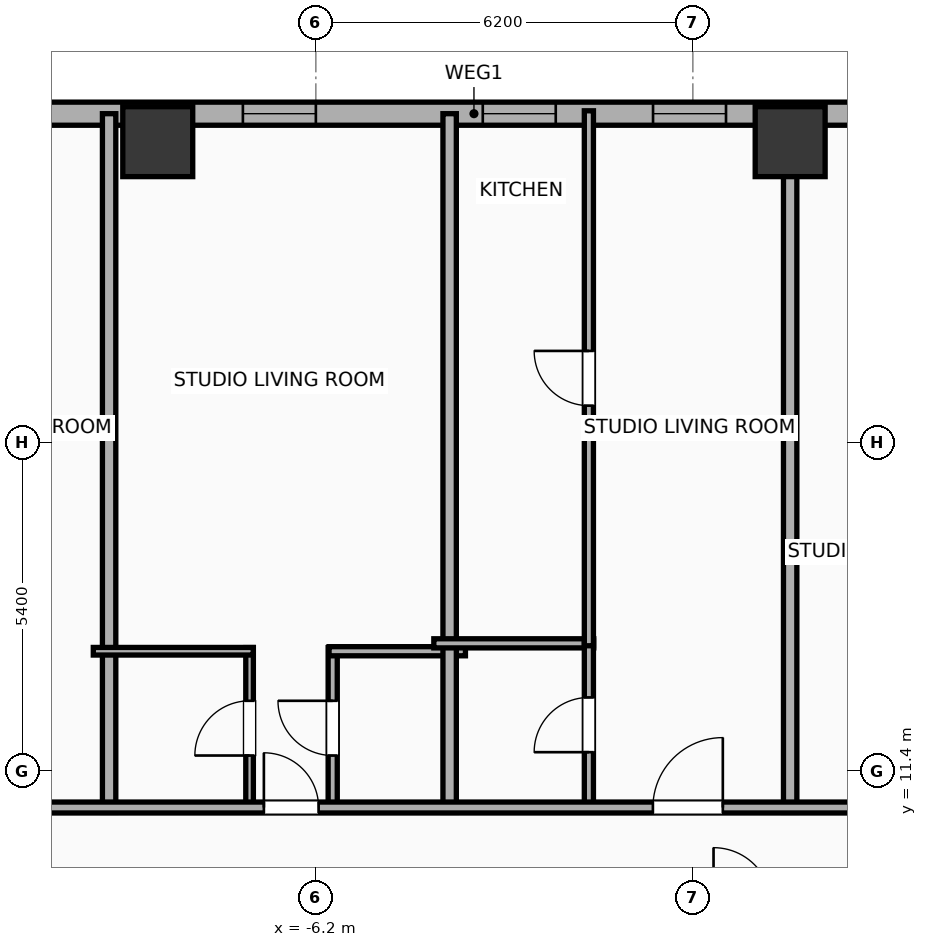
"""IFC4 building model, lengths in metres.
Left out: names, types, materials, properties, quantities, classifications, styles, units other than length and angle.
Written with IfcOpenShell. Run it as: python <this file> out.ifc"""

import sys

from ifc_helpers import new_model, si_unit, direction, frame, frame_2d, origin, origin_2d, place, context, subcontext, project, spatial, rectangle, hollow_rectangle, extrude, element, fill, save


model = new_model("IFC4")
c1 = context("Model", 3, precision=1e-05, world=origin(), true_north=direction((0.0, 1.0)))
c2 = subcontext(c1, "Body", "Model", "MODEL_VIEW")
j1 = project(units=[si_unit("LENGTHUNIT", "METRE"), si_unit("PLANEANGLEUNIT", "RADIAN")], contexts=[c1])
p1 = place(None, origin())
s1 = spatial("IfcSite", under=j1, at=p1, CompositionType="ELEMENT")
p2 = place(p1, origin())
s2 = spatial("IfcBuilding", under=s1, at=p2, CompositionType="ELEMENT")
p3 = place(p2, frame((0.0, 0.0, 29.9)))
s3 = spatial("IfcBuildingStorey", under=s2, at=p3, CompositionType="ELEMENT", Elevation=29.9)
for number, where, z_axis, x_axis in (
    (1, (1.6, 21.75, 0.0), (0.0, 0.0, 1.0), (1.0, 0.0, 0.0)),
    (2, (-8.8, 21.75, 0.0), (0.0, 0.0, 1.0), (1.0, 0.0, 0.0)),
):
    element("IfcColumn", number, at=place(p3, frame(where, z_axis=z_axis, x_axis=x_axis)), inside=s3, PredefinedType="COLUMN", context=c2, shape_type="SweptSolid", body=[
        extrude(hollow_rectangle(XDim=1.15, YDim=1.15, WallThickness=0.04, at=origin_2d()), origin(), (0.0, 0.0, 1.0), 3.9),
    ])
p4 = place(p3, frame((-29.581, 22.21, 0.0), z_axis=(0.0, 0.0, 1.0), x_axis=(1.0, 0.0, 0.0)))
e3 = element("IfcWall", 3, at=p4, inside=s3, PredefinedType="ELEMENTEDWALL", context=c2, shape_type="SweptSolid", body=[
    extrude(rectangle(XDim=51.963, YDim=0.38, at=frame_2d((25.981, 0.0))), origin(), (0.0, 0.0, 1.0), 2.54),
])
p5 = place(p4, frame((5.81, 0.0, 0.75)))
e4 = element("IfcOpeningElement", 4, at=p5, cuts=e3, PredefinedType="OPENING", context=c2, shape_type="SweptSolid", body=[
    extrude(rectangle(XDim=2.4, YDim=1.63, at=frame_2d((1.2, 0.815))), frame((0.0, 0.2, 0.0), z_axis=(0.0, -1.0, 0.0), x_axis=(1.0, 0.0, 0.0)), (0.0, 0.0, 1.0), 0.4),
])
p6 = place(p4, frame((42.952, 0.0, 0.75)))
e5 = element("IfcOpeningElement", 5, at=p6, cuts=e3, PredefinedType="OPENING", context=c2, shape_type="SweptSolid", body=[
    extrude(rectangle(XDim=2.4, YDim=1.63, at=frame_2d((1.2, 0.815))), frame((0.0, 0.2, 0.0), z_axis=(0.0, -1.0, 0.0), x_axis=(1.0, 0.0, 0.0)), (0.0, 0.0, 1.0), 0.4),
])
p7 = place(p4, frame((1.436, 0.0, 0.75)))
e6 = element("IfcOpeningElement", 6, at=p7, cuts=e3, PredefinedType="OPENING", context=c2, shape_type="SweptSolid", body=[
    extrude(rectangle(XDim=1.2, YDim=1.63, at=frame_2d((0.6, 0.815))), frame((0.0, 0.2, 0.0), z_axis=(0.0, -1.0, 0.0), x_axis=(1.0, 0.0, 0.0)), (0.0, 0.0, 1.0), 0.4),
])
p8 = place(p4, frame((3.686, 0.0, 0.75)))
e7 = element("IfcOpeningElement", 7, at=p8, cuts=e3, PredefinedType="OPENING", context=c2, shape_type="SweptSolid", body=[
    extrude(rectangle(XDim=1.2, YDim=1.63, at=frame_2d((0.6, 0.815))), frame((0.0, 0.2, 0.0), z_axis=(0.0, -1.0, 0.0), x_axis=(1.0, 0.0, 0.0)), (0.0, 0.0, 1.0), 0.4),
])
p9 = place(p4, frame((11.221, 0.0, 0.75)))
e8 = element("IfcOpeningElement", 8, at=p9, cuts=e3, PredefinedType="OPENING", context=c2, shape_type="SweptSolid", body=[
    extrude(rectangle(XDim=1.2, YDim=1.63, at=frame_2d((0.6, 0.815))), frame((0.0, 0.2, 0.0), z_axis=(0.0, -1.0, 0.0), x_axis=(1.0, 0.0, 0.0)), (0.0, 0.0, 1.0), 0.4),
])
p10 = place(p4, frame((17.686, 0.0, 0.75)))
e9 = element("IfcOpeningElement", 9, at=p10, cuts=e3, PredefinedType="OPENING", context=c2, shape_type="SweptSolid", body=[
    extrude(rectangle(XDim=1.2, YDim=1.63, at=frame_2d((0.6, 0.815))), frame((0.0, 0.2, 0.0), z_axis=(0.0, -1.0, 0.0), x_axis=(1.0, 0.0, 0.0)), (0.0, 0.0, 1.0), 0.4),
])
p11 = place(p4, frame((14.886, 0.0, 0.75)))
e10 = element("IfcOpeningElement", 10, at=p11, cuts=e3, PredefinedType="OPENING", context=c2, shape_type="SweptSolid", body=[
    extrude(rectangle(XDim=1.2, YDim=1.63, at=frame_2d((0.6, 0.815))), frame((0.0, 0.2, 0.0), z_axis=(0.0, -1.0, 0.0), x_axis=(1.0, 0.0, 0.0)), (0.0, 0.0, 1.0), 0.4),
])
p12 = place(p4, frame((22.181, 0.0, 0.75)))
e11 = element("IfcOpeningElement", 11, at=p12, cuts=e3, PredefinedType="OPENING", context=c2, shape_type="SweptSolid", body=[
    extrude(rectangle(XDim=1.2, YDim=1.63, at=frame_2d((0.6, 0.815))), frame((0.0, 0.2, 0.0), z_axis=(0.0, -1.0, 0.0), x_axis=(1.0, 0.0, 0.0)), (0.0, 0.0, 1.0), 0.4),
])
p13 = place(p4, frame((28.926, 0.0, 0.75)))
e12 = element("IfcOpeningElement", 12, at=p13, cuts=e3, PredefinedType="OPENING", context=c2, shape_type="SweptSolid", body=[
    extrude(rectangle(XDim=1.2, YDim=1.63, at=frame_2d((0.6, 0.815))), frame((0.0, 0.2, 0.0), z_axis=(0.0, -1.0, 0.0), x_axis=(1.0, 0.0, 0.0)), (0.0, 0.0, 1.0), 0.4),
])
p14 = place(p4, frame((26.126, 0.0, 0.75)))
e13 = element("IfcOpeningElement", 13, at=p14, cuts=e3, PredefinedType="OPENING", context=c2, shape_type="SweptSolid", body=[
    extrude(rectangle(XDim=1.2, YDim=1.63, at=frame_2d((0.6, 0.815))), frame((0.0, 0.2, 0.0), z_axis=(0.0, -1.0, 0.0), x_axis=(1.0, 0.0, 0.0)), (0.0, 0.0, 1.0), 0.4),
])
p15 = place(p4, frame((32.276, 0.0, 0.75)))
e14 = element("IfcOpeningElement", 14, at=p15, cuts=e3, PredefinedType="OPENING", context=c2, shape_type="SweptSolid", body=[
    extrude(rectangle(XDim=1.2, YDim=1.63, at=frame_2d((0.6, 0.815))), frame((0.0, 0.2, 0.0), z_axis=(0.0, -1.0, 0.0), x_axis=(1.0, 0.0, 0.0)), (0.0, 0.0, 1.0), 0.4),
])
p16 = place(p4, frame((35.076, 0.0, 0.75)))
e15 = element("IfcOpeningElement", 15, at=p16, cuts=e3, PredefinedType="OPENING", context=c2, shape_type="SweptSolid", body=[
    extrude(rectangle(XDim=1.2, YDim=1.63, at=frame_2d((0.6, 0.815))), frame((0.0, 0.2, 0.0), z_axis=(0.0, -1.0, 0.0), x_axis=(1.0, 0.0, 0.0)), (0.0, 0.0, 1.0), 0.4),
])
p17 = place(p4, frame((38.981, 0.0, 0.75)))
e16 = element("IfcOpeningElement", 16, at=p17, cuts=e3, PredefinedType="OPENING", context=c2, shape_type="SweptSolid", body=[
    extrude(rectangle(XDim=1.2, YDim=1.63, at=frame_2d((0.6, 0.815))), frame((0.0, 0.2, 0.0), z_axis=(0.0, -1.0, 0.0), x_axis=(1.0, 0.0, 0.0)), (0.0, 0.0, 1.0), 0.4),
])
p18 = place(p4, frame((46.276, 0.0, 0.75)))
e17 = element("IfcOpeningElement", 17, at=p18, cuts=e3, PredefinedType="OPENING", context=c2, shape_type="SweptSolid", body=[
    extrude(rectangle(XDim=1.2, YDim=1.63, at=frame_2d((0.6, 0.815))), frame((0.0, 0.2, 0.0), z_axis=(0.0, -1.0, 0.0), x_axis=(1.0, 0.0, 0.0)), (0.0, 0.0, 1.0), 0.4),
])
p19 = place(p4, frame((48.927, 0.0, 0.75)))
e18 = element("IfcOpeningElement", 18, at=p19, cuts=e3, PredefinedType="OPENING", context=c2, shape_type="SweptSolid", body=[
    extrude(rectangle(XDim=1.2, YDim=1.63, at=frame_2d((0.6, 0.815))), frame((0.0, 0.2, 0.0), z_axis=(0.0, -1.0, 0.0), x_axis=(1.0, 0.0, 0.0)), (0.0, 0.0, 1.0), 0.4),
])
p20 = place(p3, frame((-9.6, 10.72, 0.0), z_axis=(0.0, 0.0, 1.0), x_axis=(0.0, 1.0, 0.0)))
e19 = element("IfcWall", 19, at=p20, inside=s3, PredefinedType="PARTITIONING", context=c2, shape_type="SweptSolid", body=[
    extrude(rectangle(XDim=11.49, YDim=0.22, at=frame_2d((5.745, 0.0))), origin(), (0.0, 0.0, 1.0), 2.54),
])
p21 = place(p3, frame((-7.29, 10.78, 0.0), z_axis=(0.0, 0.0, 1.0), x_axis=(0.0, 1.0, 0.0)))
e20 = element("IfcWall", 20, at=p21, inside=s3, PredefinedType="PARTITIONING", context=c2, shape_type="SweptSolid", body=[
    extrude(rectangle(XDim=2.65, YDim=0.125, at=frame_2d((1.325, 0.0))), origin(), (0.0, 0.0, 1.0), 3.65),
])
p22 = place(p21, frame((0.875, 0.0, 0.0)))
e21 = element("IfcOpeningElement", 21, at=p22, cuts=e20, PredefinedType="OPENING", context=c2, shape_type="SweptSolid", body=[
    extrude(rectangle(XDim=0.9, YDim=2.05, at=frame_2d((0.45, 1.025))), frame((0.0, 0.073, 0.0), z_axis=(0.0, -1.0, 0.0), x_axis=(1.0, 0.0, 0.0)), (0.0, 0.0, 1.0), 0.145),
])
p23 = place(p3, frame((-5.923, 10.78, 0.0), z_axis=(0.0, 0.0, 1.0), x_axis=(0.0, 1.0, 0.0)))
e22 = element("IfcWall", 22, at=p23, inside=s3, PredefinedType="PLUMBINGWALL", context=c2, shape_type="SweptSolid", body=[
    extrude(rectangle(XDim=2.65, YDim=0.15, at=frame_2d((1.325, 0.0))), origin(), (0.0, 0.0, 1.0), 3.65),
])
p24 = place(p23, frame((0.875, 0.0, 0.0)))
e23 = element("IfcOpeningElement", 23, at=p24, cuts=e22, PredefinedType="OPENING", context=c2, shape_type="SweptSolid", body=[
    extrude(rectangle(XDim=0.9, YDim=2.05, at=frame_2d((0.45, 1.025))), frame((0.0, 0.085, 0.0), z_axis=(0.0, -1.0, 0.0), x_axis=(1.0, 0.0, 0.0)), (0.0, 0.0, 1.0), 0.17),
])
p25 = place(p3, frame((-9.86, 13.37, 0.0), z_axis=(0.0, 0.0, 1.0), x_axis=(1.0, 0.0, 0.0)))
e24 = element("IfcWall", 24, at=p25, inside=s3, PredefinedType="PARTITIONING", context=c2, shape_type="SweptSolid", body=[
    extrude(rectangle(XDim=2.63, YDim=0.125, at=frame_2d((1.315, 0.0))), origin(), (0.0, 0.0, 1.0), 3.65),
])
p26 = place(p3, frame((-5.983, 13.37, 0.0), z_axis=(0.0, 0.0, 1.0), x_axis=(1.0, 0.0, 0.0)))
e25 = element("IfcWall", 25, at=p26, inside=s3, PredefinedType="PLUMBINGWALL", context=c2, shape_type="SweptSolid", body=[
    extrude(rectangle(XDim=2.243, YDim=0.15, at=frame_2d((1.122, 0.0))), origin(), (0.0, 0.0, 1.0), 3.65),
])
p27 = place(p3, frame((-4.0, 10.72, 0.0), z_axis=(0.0, 0.0, 1.0), x_axis=(0.0, 1.0, 0.0)))
e26 = element("IfcWall", 26, at=p27, inside=s3, PredefinedType="PARTITIONING", context=c2, shape_type="SweptSolid", body=[
    extrude(rectangle(XDim=11.49, YDim=0.22, at=frame_2d((5.745, 0.0))), origin(), (0.0, 0.0, 1.0), 3.65),
])
p28 = place(p3, frame((-4.26, 13.5, 0.0), z_axis=(0.0, 0.0, 1.0), x_axis=(1.0, 0.0, 0.0)))
e27 = element("IfcWall", 27, at=p28, inside=s3, PredefinedType="PLUMBINGWALL", context=c2, shape_type="SweptSolid", body=[
    extrude(rectangle(XDim=2.63, YDim=0.15, at=frame_2d((1.315, 0.0))), origin(), (0.0, 0.0, 1.0), 3.65),
])
p29 = place(p3, frame((-1.71, 10.78, 0.0), z_axis=(0.0, 0.0, 1.0), x_axis=(0.0, 1.0, 0.0)))
e28 = element("IfcWall", 28, at=p29, inside=s3, PredefinedType="PLUMBINGWALL", context=c2, shape_type="SweptSolid", body=[
    extrude(rectangle(XDim=2.76, YDim=0.15, at=frame_2d((1.38, 0.0))), origin(), (0.0, 0.0, 1.0), 3.65),
])
p30 = place(p29, frame((0.93, 0.0, 0.0)))
e29 = element("IfcOpeningElement", 29, at=p30, cuts=e28, PredefinedType="OPENING", context=c2, shape_type="SweptSolid", body=[
    extrude(rectangle(XDim=0.9, YDim=2.05, at=frame_2d((0.45, 1.025))), frame((0.0, 0.085, 0.0), z_axis=(0.0, -1.0, 0.0), x_axis=(1.0, 0.0, 0.0)), (0.0, 0.0, 1.0), 0.17),
])
p31 = place(p3, frame((-1.71, 13.46, 0.0), z_axis=(0.0, 0.0, 1.0), x_axis=(0.0, 1.0, 0.0)))
e30 = element("IfcWall", 30, at=p31, inside=s3, PredefinedType="PLUMBINGWALL", context=c2, shape_type="SweptSolid", body=[
    extrude(rectangle(XDim=8.798, YDim=0.15, at=frame_2d((4.399, 0.0))), origin(), (0.0, 0.0, 1.0), 3.65),
])
p32 = place(p31, frame((3.949, 0.0, 0.0)))
e31 = element("IfcOpeningElement", 31, at=p32, cuts=e30, PredefinedType="OPENING", context=c2, shape_type="SweptSolid", body=[
    extrude(rectangle(XDim=0.9, YDim=2.05, at=frame_2d((0.45, 1.025))), frame((0.0, 0.085, 0.0), z_axis=(0.0, -1.0, 0.0), x_axis=(1.0, 0.0, 0.0)), (0.0, 0.0, 1.0), 0.17),
])
p33 = place(p3, frame((1.6, 10.72, 0.0), z_axis=(0.0, 0.0, 1.0), x_axis=(0.0, 1.0, 0.0)))
e32 = element("IfcWall", 32, at=p33, inside=s3, PredefinedType="PARTITIONING", context=c2, shape_type="SweptSolid", body=[
    extrude(rectangle(XDim=11.49, YDim=0.22, at=frame_2d((5.745, 0.0))), origin(), (0.0, 0.0, 1.0), 2.54),
])
p34 = place(p3, frame((-33.41, 10.8, 0.0), z_axis=(0.0, 0.0, 1.0), x_axis=(1.0, 0.0, 0.0)))
e33 = element("IfcWall", 33, at=p34, inside=s3, PredefinedType="PARTITIONING", context=c2, shape_type="SweptSolid", body=[
    extrude(rectangle(XDim=59.62, YDim=0.18, at=frame_2d((29.81, 0.0))), origin(), (0.0, 0.0, 1.0), 3.65),
])
p35 = place(p34, frame((3.062, 0.0, 0.0)))
e34 = element("IfcOpeningElement", 34, at=p35, cuts=e33, PredefinedType="OPENING", context=c2, shape_type="SweptSolid", body=[
    extrude(rectangle(XDim=1.15, YDim=2.05, at=frame_2d((0.575, 1.025))), frame((0.0, 0.1, 0.0), z_axis=(0.0, -1.0, 0.0), x_axis=(1.0, 0.0, 0.0)), (0.0, 0.0, 1.0), 0.2),
])
p36 = place(p34, frame((10.312, 0.0, 0.0)))
e35 = element("IfcOpeningElement", 35, at=p36, cuts=e33, PredefinedType="OPENING", context=c2, shape_type="SweptSolid", body=[
    extrude(rectangle(XDim=1.15, YDim=2.05, at=frame_2d((0.575, 1.025))), frame((0.0, 0.1, 0.0), z_axis=(0.0, -1.0, 0.0), x_axis=(1.0, 0.0, 0.0)), (0.0, 0.0, 1.0), 0.2),
])
p37 = place(p34, frame((15.153, 0.0, 0.0)))
e36 = element("IfcOpeningElement", 36, at=p37, cuts=e33, PredefinedType="OPENING", context=c2, shape_type="SweptSolid", body=[
    extrude(rectangle(XDim=0.9, YDim=2.05, at=frame_2d((0.45, 1.025))), frame((0.0, 0.1, 0.0), z_axis=(0.0, -1.0, 0.0), x_axis=(1.0, 0.0, 0.0)), (0.0, 0.0, 1.0), 0.2),
])
p38 = place(p34, frame((21.508, 0.0, 0.0)))
e37 = element("IfcOpeningElement", 37, at=p38, cuts=e33, PredefinedType="OPENING", context=c2, shape_type="SweptSolid", body=[
    extrude(rectangle(XDim=1.15, YDim=2.05, at=frame_2d((0.575, 1.025))), frame((0.0, 0.1, 0.0), z_axis=(0.0, -1.0, 0.0), x_axis=(1.0, 0.0, 0.0)), (0.0, 0.0, 1.0), 0.2),
])
p39 = place(p34, frame((26.355, 0.0, 0.0)))
e38 = element("IfcOpeningElement", 38, at=p39, cuts=e33, PredefinedType="OPENING", context=c2, shape_type="SweptSolid", body=[
    extrude(rectangle(XDim=0.9, YDim=2.05, at=frame_2d((0.45, 1.025))), frame((0.0, 0.1, 0.0), z_axis=(0.0, -1.0, 0.0), x_axis=(1.0, 0.0, 0.0)), (0.0, 0.0, 1.0), 0.2),
])
p40 = place(p34, frame((32.753, 0.0, 0.0)))
e39 = element("IfcOpeningElement", 39, at=p40, cuts=e33, PredefinedType="OPENING", context=c2, shape_type="SweptSolid", body=[
    extrude(rectangle(XDim=1.15, YDim=2.05, at=frame_2d((0.575, 1.025))), frame((0.0, 0.1, 0.0), z_axis=(0.0, -1.0, 0.0), x_axis=(1.0, 0.0, 0.0)), (0.0, 0.0, 1.0), 0.2),
])
p41 = place(p34, frame((36.163, 0.0, 0.0)))
e40 = element("IfcOpeningElement", 40, at=p41, cuts=e33, PredefinedType="OPENING", context=c2, shape_type="SweptSolid", body=[
    extrude(rectangle(XDim=1.15, YDim=2.05, at=frame_2d((0.575, 1.025))), frame((0.0, 0.1, 0.0), z_axis=(0.0, -1.0, 0.0), x_axis=(1.0, 0.0, 0.0)), (0.0, 0.0, 1.0), 0.2),
])
p42 = place(p34, frame((43.156, 0.0, 0.0)))
e41 = element("IfcOpeningElement", 41, at=p42, cuts=e33, PredefinedType="OPENING", context=c2, shape_type="SweptSolid", body=[
    extrude(rectangle(XDim=0.9, YDim=2.05, at=frame_2d((0.45, 1.025))), frame((0.0, 0.1, 0.0), z_axis=(0.0, -1.0, 0.0), x_axis=(1.0, 0.0, 0.0)), (0.0, 0.0, 1.0), 0.2),
])
p43 = place(p34, frame((47.36, 0.0, 0.0)))
e42 = element("IfcOpeningElement", 42, at=p43, cuts=e33, PredefinedType="OPENING", context=c2, shape_type="SweptSolid", body=[
    extrude(rectangle(XDim=1.15, YDim=2.05, at=frame_2d((0.575, 1.025))), frame((0.0, 0.1, 0.0), z_axis=(0.0, -1.0, 0.0), x_axis=(1.0, 0.0, 0.0)), (0.0, 0.0, 1.0), 0.2),
])
p44 = place(p34, frame((55.337, 0.0, 0.0)))
e43 = element("IfcOpeningElement", 43, at=p44, cuts=e33, PredefinedType="OPENING", context=c2, shape_type="SweptSolid", body=[
    extrude(rectangle(XDim=1.15, YDim=2.05, at=frame_2d((0.575, 1.025))), frame((0.0, 0.1, 0.0), z_axis=(0.0, -1.0, 0.0), x_axis=(1.0, 0.0, 0.0)), (0.0, 0.0, 1.0), 0.2),
])
p45 = place(p12, origin())
e44 = element("IfcWindow", 44, at=p45, inside=s3, PartitioningType="SINGLE_PANEL", PredefinedType="WINDOW", context=c2, shape_type="SweptSolid", body=[
    extrude(rectangle(XDim=1.2, YDim=1.63, at=frame_2d((0.6, 0.815))), frame((0.0, 0.03, 0.0), z_axis=(0.0, -1.0, 0.0), x_axis=(1.0, 0.0, 0.0)), (0.0, 0.0, 1.0), 0.06),
])
fill(e11, e44)
p46 = place(p13, origin())
e45 = element("IfcWindow", 45, at=p46, inside=s3, PartitioningType="SINGLE_PANEL", PredefinedType="WINDOW", context=c2, shape_type="SweptSolid", body=[
    extrude(rectangle(XDim=1.2, YDim=1.63, at=frame_2d((0.6, 0.815))), frame((0.0, 0.03, 0.0), z_axis=(0.0, -1.0, 0.0), x_axis=(1.0, 0.0, 0.0)), (0.0, 0.0, 1.0), 0.06),
])
fill(e12, e45)
p47 = place(p14, origin())
e46 = element("IfcWindow", 46, at=p47, inside=s3, PartitioningType="SINGLE_PANEL", PredefinedType="WINDOW", context=c2, shape_type="SweptSolid", body=[
    extrude(rectangle(XDim=1.2, YDim=1.63, at=frame_2d((0.6, 0.815))), frame((0.0, 0.03, 0.0), z_axis=(0.0, -1.0, 0.0), x_axis=(1.0, 0.0, 0.0)), (0.0, 0.0, 1.0), 0.06),
])
fill(e13, e46)
p48 = place(p22, origin())
e47 = element("IfcDoor", 47, at=p48, inside=s3, OperationType="SINGLE_SWING_LEFT", PredefinedType="DOOR", context=c2, shape_type="SweptSolid", body=[
    extrude(rectangle(XDim=0.9, YDim=2.05, at=frame_2d((0.45, 1.025))), frame((0.0, 0.025, 0.0), z_axis=(0.0, -1.0, 0.0), x_axis=(1.0, 0.0, 0.0)), (0.0, 0.0, 1.0), 0.05),
])
fill(e21, e47)
p49 = place(p24, origin())
e48 = element("IfcDoor", 48, at=p49, inside=s3, OperationType="SINGLE_SWING_RIGHT", PredefinedType="DOOR", context=c2, shape_type="SweptSolid", body=[
    extrude(rectangle(XDim=0.9, YDim=2.05, at=frame_2d((0.45, 1.025))), frame((0.0, 0.025, 0.0), z_axis=(0.0, -1.0, 0.0), x_axis=(1.0, 0.0, 0.0)), (0.0, 0.0, 1.0), 0.05),
])
fill(e23, e48)
p50 = place(p30, origin())
e49 = element("IfcDoor", 49, at=p50, inside=s3, OperationType="SINGLE_SWING_LEFT", PredefinedType="DOOR", context=c2, shape_type="SweptSolid", body=[
    extrude(rectangle(XDim=0.9, YDim=2.05, at=frame_2d((0.45, 1.025))), frame((0.0, 0.025, 0.0), z_axis=(0.0, -1.0, 0.0), x_axis=(1.0, 0.0, 0.0)), (0.0, 0.0, 1.0), 0.05),
])
fill(e29, e49)
p51 = place(p32, origin())
e50 = element("IfcDoor", 50, at=p51, inside=s3, OperationType="SINGLE_SWING_RIGHT", PredefinedType="DOOR", context=c2, shape_type="SweptSolid", body=[
    extrude(rectangle(XDim=0.9, YDim=2.05, at=frame_2d((0.45, 1.025))), frame((0.0, 0.025, 0.0), z_axis=(0.0, -1.0, 0.0), x_axis=(1.0, 0.0, 0.0)), (0.0, 0.0, 1.0), 0.05),
])
fill(e31, e50)
p52 = place(p39, origin())
e51 = element("IfcDoor", 51, at=p52, inside=s3, OperationType="SINGLE_SWING_LEFT", PredefinedType="DOOR", context=c2, shape_type="SweptSolid", body=[
    extrude(rectangle(XDim=0.9, YDim=2.05, at=frame_2d((0.45, 1.025))), frame((0.0, 0.025, 0.0), z_axis=(0.0, -1.0, 0.0), x_axis=(1.0, 0.0, 0.0)), (0.0, 0.0, 1.0), 0.05),
])
fill(e38, e51)
p53 = place(p40, origin())
e52 = element("IfcDoor", 52, at=p53, inside=s3, OperationType="SINGLE_SWING_RIGHT", PredefinedType="DOOR", context=c2, shape_type="SweptSolid", body=[
    extrude(rectangle(XDim=1.15, YDim=2.05, at=frame_2d((0.575, 1.025))), frame((0.0, 0.025, 0.0), z_axis=(0.0, -1.0, 0.0), x_axis=(1.0, 0.0, 0.0)), (0.0, 0.0, 1.0), 0.05),
])
fill(e39, e52)
save(model, sys.argv[1])
